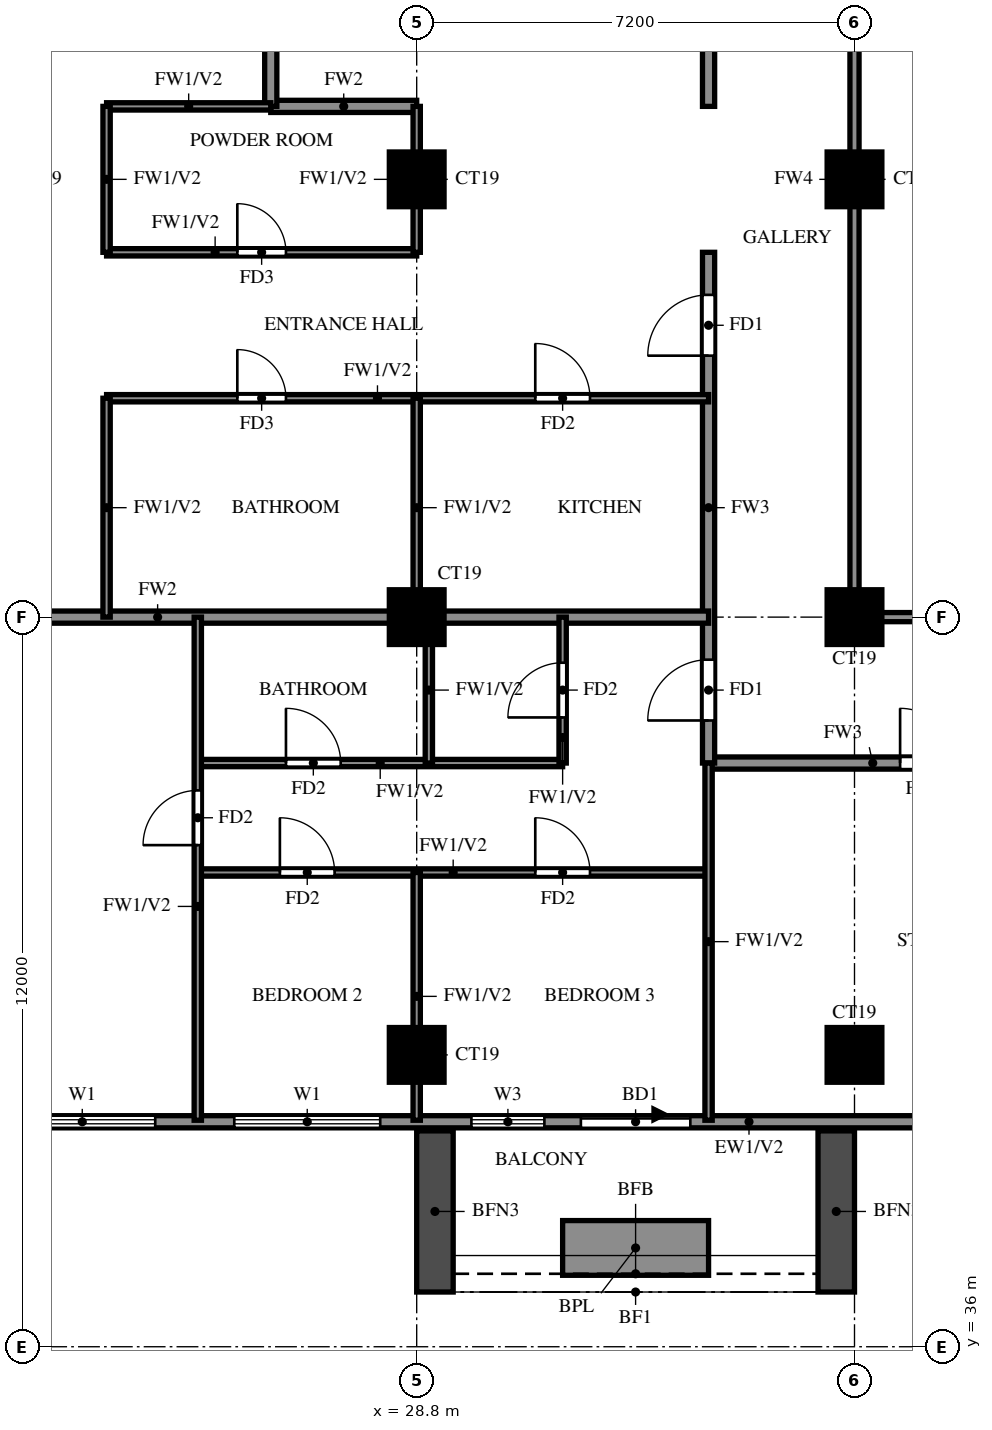
"""IFC4 building model, lengths in metres.
Left out: names, types, materials, properties, quantities, classifications, styles, units other than length and angle.
Written with IfcOpenShell. Run it as: python <this file> out.ifc"""

import sys

from ifc_helpers import new_model, si_unit, direction, frame, frame_2d, origin, origin_2d, place, context, subcontext, project, spatial, rectangle, extrude, source, transform, mapped, element, fill, save


model = new_model("IFC4")
c1 = context("Model", 3, precision=1e-05, world=origin(), true_north=direction((0.0, 1.0)))
c2 = subcontext(c1, "Body", "Model", "MODEL_VIEW")
j1 = project(units=[si_unit("LENGTHUNIT", "METRE"), si_unit("PLANEANGLEUNIT", "RADIAN")], contexts=[c1])
p1 = place(None, origin())
s1 = spatial("IfcSite", under=j1, at=p1, CompositionType="ELEMENT")
p2 = place(p1, origin())
s2 = spatial("IfcBuilding", under=s1, at=p2, CompositionType="ELEMENT")
p3 = place(p2, frame((0.0, 0.0, 178.0)))
s3 = spatial("IfcBuildingStorey", under=s2, at=p3, CompositionType="ELEMENT", Elevation=178.0)
m1 = source(origin(), c2, "Body", "SweptSolid", [
    extrude(rectangle(XDim=0.9, YDim=0.9, at=origin_2d()), origin(), (0.0, 0.0, 1.0), 3.2),
])
for number, where, z_axis, x_axis in (
    (1, (28.8, 40.8, 0.0), (0.0, 0.0, 1.0), (1.0, 0.0, 0.0)),
    (2, (36.0, 40.8, 0.0), (0.0, 0.0, 1.0), (1.0, 0.0, 0.0)),
    (3, (28.8, 48.0, 0.0), (0.0, 0.0, 1.0), (1.0, 0.0, 0.0)),
    (4, (36.0, 48.0, 0.0), (0.0, 0.0, 1.0), (1.0, 0.0, 0.0)),
    (5, (28.8, 55.2, 0.0), (0.0, 0.0, 1.0), (1.0, 0.0, 0.0)),
    (6, (36.0, 55.2, 0.0), (0.0, 0.0, 1.0), (1.0, 0.0, 0.0)),
):
    element("IfcColumn", number, at=place(p3, frame(where, z_axis=z_axis, x_axis=x_axis)), inside=s3, PredefinedType="COLUMN", context=c2, shape_type="MappedRepresentation", body=[
        mapped(m1, transform((0.0, 0.0, 0.0))),
    ])
p4 = place(p3, frame((18.2, 39.7, 0.0), z_axis=(0.0, 0.0, 1.0), x_axis=(1.0, 0.0, 0.0)))
e7 = element("IfcWall", 7, at=p4, inside=s3, PredefinedType="SOLIDWALL", context=c2, shape_type="SweptSolid", body=[
    extrude(rectangle(XDim=23.8, YDim=0.2, at=frame_2d((11.9, 0.0))), origin(), (0.0, 0.0, 1.0), 3.2),
])
p5 = place(p4, frame((13.3, 0.0, 0.0)))
e8 = element("IfcOpeningElement", 8, at=p5, cuts=e7, PredefinedType="OPENING", context=c2, shape_type="SweptSolid", body=[
    extrude(rectangle(XDim=1.8, YDim=2.4, at=frame_2d((0.9, 1.2))), frame((0.0, 0.11, 0.0), z_axis=(0.0, -1.0, 0.0), x_axis=(1.0, 0.0, 0.0)), (0.0, 0.0, 1.0), 0.22),
])
p6 = place(p4, frame((0.9, 0.0, 0.6)))
e9 = element("IfcOpeningElement", 9, at=p6, cuts=e7, PredefinedType="OPENING", context=c2, shape_type="SweptSolid", body=[
    extrude(rectangle(XDim=2.4, YDim=2.4, at=frame_2d((1.2, 1.2))), frame((0.0, 0.11, 0.0), z_axis=(0.0, -1.0, 0.0), x_axis=(1.0, 0.0, 0.0)), (0.0, 0.0, 1.0), 0.22),
])
p7 = place(p4, frame((3.9, 0.0, 0.6)))
e10 = element("IfcOpeningElement", 10, at=p7, cuts=e7, PredefinedType="OPENING", context=c2, shape_type="SweptSolid", body=[
    extrude(rectangle(XDim=2.4, YDim=2.4, at=frame_2d((1.2, 1.2))), frame((0.0, 0.11, 0.0), z_axis=(0.0, -1.0, 0.0), x_axis=(1.0, 0.0, 0.0)), (0.0, 0.0, 1.0), 0.22),
])
p8 = place(p4, frame((7.6, 0.0, 0.6)))
e11 = element("IfcOpeningElement", 11, at=p8, cuts=e7, PredefinedType="OPENING", context=c2, shape_type="SweptSolid", body=[
    extrude(rectangle(XDim=2.4, YDim=2.4, at=frame_2d((1.2, 1.2))), frame((0.0, 0.11, 0.0), z_axis=(0.0, -1.0, 0.0), x_axis=(1.0, 0.0, 0.0)), (0.0, 0.0, 1.0), 0.22),
])
p9 = place(p4, frame((11.5, 0.0, 0.6)))
e12 = element("IfcOpeningElement", 12, at=p9, cuts=e7, PredefinedType="OPENING", context=c2, shape_type="SweptSolid", body=[
    extrude(rectangle(XDim=1.2, YDim=2.4, at=frame_2d((0.6, 1.2))), frame((0.0, 0.11, 0.0), z_axis=(0.0, -1.0, 0.0), x_axis=(1.0, 0.0, 0.0)), (0.0, 0.0, 1.0), 0.22),
])
for number, where, z_axis, x_axis in (
    (13, (29.1, 39.55, 0.0), (0.0, 0.0, 1.0), (0.0, -1.0, 0.0)),
    (14, (35.7, 39.55, 0.0), (0.0, 0.0, 1.0), (0.0, -1.0, 0.0)),
):
    element("IfcWall", number, at=place(p3, frame(where, z_axis=z_axis, x_axis=x_axis)), inside=s3, PredefinedType="SOLIDWALL", context=c2, shape_type="SweptSolid", body=[
        extrude(rectangle(XDim=2.65, YDim=0.6, at=frame_2d((1.325, 0.0))), origin(), (0.0, 0.0, 1.0), 2.85),
    ])
p10 = place(p3, frame((31.2, 37.625, 0.0), z_axis=(0.0, 0.0, 1.0), x_axis=(1.0, 0.0, 0.0)))
e15 = element("IfcWall", 15, at=p10, inside=s3, PredefinedType="SOLIDWALL", context=c2, shape_type="SweptSolid", body=[
    extrude(rectangle(XDim=2.4, YDim=0.9, at=frame_2d((1.2, 0.0))), origin(), (0.0, 0.0, 1.0), 0.9),
])
p11 = place(p3, frame((33.6, 45.6, 0.0), z_axis=(0.0, 0.0, 1.0), x_axis=(1.0, 0.0, 0.0)))
e16 = element("IfcWall", 16, at=p11, inside=s3, PredefinedType="SOLIDWALL", context=c2, shape_type="SweptSolid", body=[
    extrude(rectangle(XDim=7.2, YDim=0.2, at=frame_2d((3.6, 0.0))), origin(), (0.0, 0.0, 1.0), 3.2),
])
p12 = place(p11, frame((3.15, 0.0, 0.0)))
e17 = element("IfcOpeningElement", 17, at=p12, cuts=e16, PredefinedType="OPENING", context=c2, shape_type="SweptSolid", body=[
    extrude(rectangle(XDim=0.9, YDim=2.1, at=frame_2d((0.45, 1.05))), frame((0.0, 0.11, 0.0), z_axis=(0.0, -1.0, 0.0), x_axis=(1.0, 0.0, 0.0)), (0.0, 0.0, 1.0), 0.22),
])
p13 = place(p3, frame((33.6, 45.6, 0.0), z_axis=(0.0, 0.0, 1.0), x_axis=(0.0, 1.0, 0.0)))
e18 = element("IfcWall", 18, at=p13, inside=s3, PredefinedType="SOLIDWALL", context=c2, shape_type="SweptSolid", body=[
    extrude(rectangle(XDim=8.4, YDim=0.2, at=frame_2d((4.2, 0.0))), origin(), (0.0, 0.0, 1.0), 3.2),
])
p14 = place(p13, frame((0.7, 0.0, 0.0)))
e19 = element("IfcOpeningElement", 19, at=p14, cuts=e18, PredefinedType="OPENING", context=c2, shape_type="SweptSolid", body=[
    extrude(rectangle(XDim=1.0, YDim=2.1, at=frame_2d((0.5, 1.05))), frame((0.0, 0.11, 0.0), z_axis=(0.0, -1.0, 0.0), x_axis=(1.0, 0.0, 0.0)), (0.0, 0.0, 1.0), 0.22),
])
p15 = place(p13, frame((6.7, 0.0, 0.0)))
e20 = element("IfcOpeningElement", 20, at=p15, cuts=e18, PredefinedType="OPENING", context=c2, shape_type="SweptSolid", body=[
    extrude(rectangle(XDim=1.0, YDim=2.1, at=frame_2d((0.5, 1.05))), frame((0.0, 0.11, 0.0), z_axis=(0.0, -1.0, 0.0), x_axis=(1.0, 0.0, 0.0)), (0.0, 0.0, 1.0), 0.22),
])
p16 = place(p3, frame((33.6, 56.4, 0.0), z_axis=(0.0, 0.0, 1.0), x_axis=(0.0, 1.0, 0.0)))
e21 = element("IfcWall", 21, at=p16, inside=s3, PredefinedType="SOLIDWALL", context=c2, shape_type="SweptSolid", body=[
    extrude(rectangle(XDim=6.0, YDim=0.2, at=frame_2d((3.0, 0.0))), origin(), (0.0, 0.0, 1.0), 3.2),
])
p17 = place(p16, frame((3.7, 0.0, 0.0)))
e22 = element("IfcOpeningElement", 22, at=p17, cuts=e21, PredefinedType="OPENING", context=c2, shape_type="SweptSolid", body=[
    extrude(rectangle(XDim=1.0, YDim=2.1, at=frame_2d((0.5, 1.05))), frame((0.0, 0.11, 0.0), z_axis=(0.0, -1.0, 0.0), x_axis=(1.0, 0.0, 0.0)), (0.0, 0.0, 1.0), 0.22),
])
p18 = place(p3, frame((14.525, 48.0, 0.0), z_axis=(0.0, 0.0, 1.0), x_axis=(1.0, 0.0, 0.0)))
e23 = element("IfcWall", 23, at=p18, inside=s3, PredefinedType="SOLIDWALL", context=c2, shape_type="SweptSolid", body=[
    extrude(rectangle(XDim=19.075, YDim=0.2, at=frame_2d((9.538, 0.0))), origin(), (0.0, 0.0, 1.0), 3.2),
])
for number, where, z_axis, x_axis in (
    (24, (26.4, 56.4, 0.0), (0.0, 0.0, 1.0), (1.0, 0.0, 0.0)),
    (25, (26.4, 56.4, 0.0), (0.0, 0.0, 1.0), (0.0, 1.0, 0.0)),
):
    element("IfcWall", number, at=place(p3, frame(where, z_axis=z_axis, x_axis=x_axis)), inside=s3, PredefinedType="SOLIDWALL", context=c2, shape_type="SweptSolid", body=[
        extrude(rectangle(XDim=2.4, YDim=0.2, at=frame_2d((1.2, 0.0))), origin(), (0.0, 0.0, 1.0), 3.2),
    ])
p19 = place(p3, frame((25.2, 43.8, 0.0), z_axis=(0.0, 0.0, 1.0), x_axis=(1.0, 0.0, 0.0)))
e26 = element("IfcWall", 26, at=p19, inside=s3, PredefinedType="PARTITIONING", context=c2, shape_type="SweptSolid", body=[
    extrude(rectangle(XDim=8.4, YDim=0.12, at=frame_2d((4.2, 0.0))), origin(), (0.0, 0.0, 1.0), 3.2),
])
p20 = place(p19, frame((1.35, 0.0, 0.0)))
e27 = element("IfcOpeningElement", 27, at=p20, cuts=e26, PredefinedType="OPENING", context=c2, shape_type="SweptSolid", body=[
    extrude(rectangle(XDim=0.9, YDim=2.1, at=frame_2d((0.45, 1.05))), frame((0.0, 0.07, 0.0), z_axis=(0.0, -1.0, 0.0), x_axis=(1.0, 0.0, 0.0)), (0.0, 0.0, 1.0), 0.14),
])
p21 = place(p19, frame((5.55, 0.0, 0.0)))
e28 = element("IfcOpeningElement", 28, at=p21, cuts=e26, PredefinedType="OPENING", context=c2, shape_type="SweptSolid", body=[
    extrude(rectangle(XDim=0.9, YDim=2.1, at=frame_2d((0.45, 1.05))), frame((0.0, 0.07, 0.0), z_axis=(0.0, -1.0, 0.0), x_axis=(1.0, 0.0, 0.0)), (0.0, 0.0, 1.0), 0.14),
])
p22 = place(p3, frame((25.2, 45.6, 0.0), z_axis=(0.0, 0.0, 1.0), x_axis=(1.0, 0.0, 0.0)))
e29 = element("IfcWall", 29, at=p22, inside=s3, PredefinedType="PARTITIONING", context=c2, shape_type="SweptSolid", body=[
    extrude(rectangle(XDim=6.0, YDim=0.12, at=frame_2d((3.0, 0.0))), origin(), (0.0, 0.0, 1.0), 3.2),
])
p23 = place(p22, frame((1.45, 0.0, 0.0)))
e30 = element("IfcOpeningElement", 30, at=p23, cuts=e29, PredefinedType="OPENING", context=c2, shape_type="SweptSolid", body=[
    extrude(rectangle(XDim=0.9, YDim=2.1, at=frame_2d((0.45, 1.05))), frame((0.0, 0.07, 0.0), z_axis=(0.0, -1.0, 0.0), x_axis=(1.0, 0.0, 0.0)), (0.0, 0.0, 1.0), 0.14),
])
p24 = place(p3, frame((23.7, 51.6, 0.0), z_axis=(0.0, 0.0, 1.0), x_axis=(1.0, 0.0, 0.0)))
e31 = element("IfcWall", 31, at=p24, inside=s3, PredefinedType="PARTITIONING", context=c2, shape_type="SweptSolid", body=[
    extrude(rectangle(XDim=9.9, YDim=0.12, at=frame_2d((4.95, 0.0))), origin(), (0.0, 0.0, 1.0), 3.2),
])
p25 = place(p24, frame((2.15, 0.0, 0.0)))
e32 = element("IfcOpeningElement", 32, at=p25, cuts=e31, PredefinedType="OPENING", context=c2, shape_type="SweptSolid", body=[
    extrude(rectangle(XDim=0.8, YDim=2.1, at=frame_2d((0.4, 1.05))), frame((0.0, 0.07, 0.0), z_axis=(0.0, -1.0, 0.0), x_axis=(1.0, 0.0, 0.0)), (0.0, 0.0, 1.0), 0.14),
])
p26 = place(p24, frame((7.05, 0.0, 0.0)))
e33 = element("IfcOpeningElement", 33, at=p26, cuts=e31, PredefinedType="OPENING", context=c2, shape_type="SweptSolid", body=[
    extrude(rectangle(XDim=0.9, YDim=2.1, at=frame_2d((0.45, 1.05))), frame((0.0, 0.07, 0.0), z_axis=(0.0, -1.0, 0.0), x_axis=(1.0, 0.0, 0.0)), (0.0, 0.0, 1.0), 0.14),
])
p27 = place(p3, frame((23.7, 54.0, 0.0), z_axis=(0.0, 0.0, 1.0), x_axis=(1.0, 0.0, 0.0)))
e34 = element("IfcWall", 34, at=p27, inside=s3, PredefinedType="PARTITIONING", context=c2, shape_type="SweptSolid", body=[
    extrude(rectangle(XDim=5.1, YDim=0.12, at=frame_2d((2.55, 0.0))), origin(), (0.0, 0.0, 1.0), 3.2),
])
p28 = place(p27, frame((2.15, 0.0, 0.0)))
e35 = element("IfcOpeningElement", 35, at=p28, cuts=e34, PredefinedType="OPENING", context=c2, shape_type="SweptSolid", body=[
    extrude(rectangle(XDim=0.8, YDim=2.1, at=frame_2d((0.4, 1.05))), frame((0.0, 0.07, 0.0), z_axis=(0.0, -1.0, 0.0), x_axis=(1.0, 0.0, 0.0)), (0.0, 0.0, 1.0), 0.14),
])
p29 = place(p3, frame((23.7, 56.4, 0.0), z_axis=(0.0, 0.0, 1.0), x_axis=(1.0, 0.0, 0.0)))
e36 = element("IfcWall", 36, at=p29, inside=s3, PredefinedType="PARTITIONING", context=c2, shape_type="SweptSolid", body=[
    extrude(rectangle(XDim=2.7, YDim=0.12, at=frame_2d((1.35, 0.0))), origin(), (0.0, 0.0, 1.0), 3.2),
])
p30 = place(p3, frame((23.7, 48.0, 0.0), z_axis=(0.0, 0.0, 1.0), x_axis=(0.0, 1.0, 0.0)))
e37 = element("IfcWall", 37, at=p30, inside=s3, PredefinedType="PARTITIONING", context=c2, shape_type="SweptSolid", body=[
    extrude(rectangle(XDim=3.6, YDim=0.12, at=frame_2d((1.8, 0.0))), origin(), (0.0, 0.0, 1.0), 3.2),
])
p31 = place(p3, frame((23.7, 54.0, 0.0), z_axis=(0.0, 0.0, 1.0), x_axis=(0.0, 1.0, 0.0)))
e38 = element("IfcWall", 38, at=p31, inside=s3, PredefinedType="PARTITIONING", context=c2, shape_type="SweptSolid", body=[
    extrude(rectangle(XDim=2.4, YDim=0.12, at=frame_2d((1.2, 0.0))), origin(), (0.0, 0.0, 1.0), 3.2),
])
p32 = place(p3, frame((25.2, 39.725, 0.0), z_axis=(0.0, 0.0, 1.0), x_axis=(0.0, 1.0, 0.0)))
e39 = element("IfcWall", 39, at=p32, inside=s3, PredefinedType="PARTITIONING", context=c2, shape_type="SweptSolid", body=[
    extrude(rectangle(XDim=8.275, YDim=0.12, at=frame_2d((4.137, 0.0))), origin(), (0.0, 0.0, 1.0), 3.2),
])
p33 = place(p32, frame((4.525, 0.0, 0.0)))
e40 = element("IfcOpeningElement", 40, at=p33, cuts=e39, PredefinedType="OPENING", context=c2, shape_type="SweptSolid", body=[
    extrude(rectangle(XDim=0.9, YDim=2.1, at=frame_2d((0.45, 1.05))), frame((0.0, 0.07, 0.0), z_axis=(0.0, -1.0, 0.0), x_axis=(1.0, 0.0, 0.0)), (0.0, 0.0, 1.0), 0.14),
])
p34 = place(p3, frame((28.8, 39.725, 0.0), z_axis=(0.0, 0.0, 1.0), x_axis=(0.0, 1.0, 0.0)))
e41 = element("IfcWall", 41, at=p34, inside=s3, PredefinedType="PARTITIONING", context=c2, shape_type="SweptSolid", body=[
    extrude(rectangle(XDim=4.075, YDim=0.12, at=frame_2d((2.038, 0.0))), origin(), (0.0, 0.0, 1.0), 3.2),
])
p35 = place(p3, frame((28.8, 48.0, 0.0), z_axis=(0.0, 0.0, 1.0), x_axis=(0.0, 1.0, 0.0)))
e42 = element("IfcWall", 42, at=p35, inside=s3, PredefinedType="PARTITIONING", context=c2, shape_type="SweptSolid", body=[
    extrude(rectangle(XDim=3.6, YDim=0.12, at=frame_2d((1.8, 0.0))), origin(), (0.0, 0.0, 1.0), 3.2),
])
for number, where, z_axis, x_axis in (
    (43, (28.8, 54.0, 0.0), (0.0, 0.0, 1.0), (0.0, 1.0, 0.0)),
    (44, (29.0, 45.6, 0.0), (0.0, 0.0, 1.0), (0.0, 1.0, 0.0)),
):
    element("IfcWall", number, at=place(p3, frame(where, z_axis=z_axis, x_axis=x_axis)), inside=s3, PredefinedType="PARTITIONING", context=c2, shape_type="SweptSolid", body=[
        extrude(rectangle(XDim=2.4, YDim=0.12, at=frame_2d((1.2, 0.0))), origin(), (0.0, 0.0, 1.0), 3.2),
    ])
p36 = place(p3, frame((31.2, 45.6, 0.0), z_axis=(0.0, 0.0, 1.0), x_axis=(0.0, 1.0, 0.0)))
e45 = element("IfcWall", 45, at=p36, inside=s3, PredefinedType="PARTITIONING", context=c2, shape_type="SweptSolid", body=[
    extrude(rectangle(XDim=2.4, YDim=0.12, at=frame_2d((1.2, 0.0))), origin(), (0.0, 0.0, 1.0), 3.2),
])
p37 = place(p36, frame((0.75, 0.0, 0.0)))
e46 = element("IfcOpeningElement", 46, at=p37, cuts=e45, PredefinedType="OPENING", context=c2, shape_type="SweptSolid", body=[
    extrude(rectangle(XDim=0.9, YDim=2.1, at=frame_2d((0.45, 1.05))), frame((0.0, 0.07, 0.0), z_axis=(0.0, -1.0, 0.0), x_axis=(1.0, 0.0, 0.0)), (0.0, 0.0, 1.0), 0.14),
])
p38 = place(p3, frame((33.6, 39.725, 0.0), z_axis=(0.0, 0.0, 1.0), x_axis=(0.0, 1.0, 0.0)))
e47 = element("IfcWall", 47, at=p38, inside=s3, PredefinedType="PARTITIONING", context=c2, shape_type="SweptSolid", body=[
    extrude(rectangle(XDim=5.875, YDim=0.12, at=frame_2d((2.938, 0.0))), origin(), (0.0, 0.0, 1.0), 3.2),
])
p39 = place(p3, frame((36.0, 48.0, 0.0), z_axis=(0.0, 0.0, 1.0), x_axis=(1.0, 0.0, 0.0)))
e48 = element("IfcWall", 48, at=p39, inside=s3, PredefinedType="SOLIDWALL", context=c2, shape_type="SweptSolid", body=[
    extrude(rectangle(XDim=7.2, YDim=0.15, at=frame_2d((3.6, 0.0))), origin(), (0.0, 0.0, 1.0), 2.3),
])
p40 = place(p3, frame((36.0, 48.0, 0.0), z_axis=(0.0, 0.0, 1.0), x_axis=(0.0, 1.0, 0.0)))
e49 = element("IfcWall", 49, at=p40, inside=s3, PredefinedType="SOLIDWALL", context=c2, shape_type="SweptSolid", body=[
    extrude(rectangle(XDim=14.4, YDim=0.15, at=frame_2d((7.2, 0.0))), origin(), (0.0, 0.0, 1.0), 2.3),
])
p41 = place(p5, origin())
e50 = element("IfcDoor", 50, at=p41, inside=s3, OperationType="DOUBLE_DOOR_SLIDING", PredefinedType="DOOR", context=c2, shape_type="SweptSolid", body=[
    extrude(rectangle(XDim=1.8, YDim=2.4, at=frame_2d((0.9, 1.2))), frame((0.0, 0.025, 0.0), z_axis=(0.0, -1.0, 0.0), x_axis=(1.0, 0.0, 0.0)), (0.0, 0.0, 1.0), 0.05),
])
fill(e8, e50)
p42 = place(p7, origin())
e51 = element("IfcWindow", 51, at=p42, inside=s3, PartitioningType="DOUBLE_PANEL_VERTICAL", PredefinedType="WINDOW", context=c2, shape_type="SweptSolid", body=[
    extrude(rectangle(XDim=2.4, YDim=2.4, at=frame_2d((1.2, 1.2))), frame((0.0, 0.03, 0.0), z_axis=(0.0, -1.0, 0.0), x_axis=(1.0, 0.0, 0.0)), (0.0, 0.0, 1.0), 0.06),
])
fill(e10, e51)
p43 = place(p8, origin())
e52 = element("IfcWindow", 52, at=p43, inside=s3, PartitioningType="DOUBLE_PANEL_VERTICAL", PredefinedType="WINDOW", context=c2, shape_type="SweptSolid", body=[
    extrude(rectangle(XDim=2.4, YDim=2.4, at=frame_2d((1.2, 1.2))), frame((0.0, 0.03, 0.0), z_axis=(0.0, -1.0, 0.0), x_axis=(1.0, 0.0, 0.0)), (0.0, 0.0, 1.0), 0.06),
])
fill(e11, e52)
p44 = place(p9, origin())
e53 = element("IfcWindow", 53, at=p44, inside=s3, PartitioningType="SINGLE_PANEL", PredefinedType="WINDOW", context=c2, shape_type="SweptSolid", body=[
    extrude(rectangle(XDim=1.2, YDim=2.4, at=frame_2d((0.6, 1.2))), frame((0.0, 0.03, 0.0), z_axis=(0.0, -1.0, 0.0), x_axis=(1.0, 0.0, 0.0)), (0.0, 0.0, 1.0), 0.06),
])
fill(e12, e53)
p45 = place(p14, origin())
e54 = element("IfcDoor", 54, at=p45, inside=s3, OperationType="SINGLE_SWING_LEFT", PredefinedType="DOOR", context=c2, shape_type="SweptSolid", body=[
    extrude(rectangle(XDim=1.0, YDim=2.1, at=frame_2d((0.5, 1.05))), frame((0.0, 0.025, 0.0), z_axis=(0.0, -1.0, 0.0), x_axis=(1.0, 0.0, 0.0)), (0.0, 0.0, 1.0), 0.05),
])
fill(e19, e54)
p46 = place(p33, origin())
e55 = element("IfcDoor", 55, at=p46, inside=s3, OperationType="SINGLE_SWING_RIGHT", PredefinedType="DOOR", context=c2, shape_type="SweptSolid", body=[
    extrude(rectangle(XDim=0.9, YDim=2.1, at=frame_2d((0.45, 1.05))), frame((0.0, 0.025, 0.0), z_axis=(0.0, -1.0, 0.0), x_axis=(1.0, 0.0, 0.0)), (0.0, 0.0, 1.0), 0.05),
])
fill(e40, e55)
p47 = place(p20, origin())
e56 = element("IfcDoor", 56, at=p47, inside=s3, OperationType="SINGLE_SWING_LEFT", PredefinedType="DOOR", context=c2, shape_type="SweptSolid", body=[
    extrude(rectangle(XDim=0.9, YDim=2.1, at=frame_2d((0.45, 1.05))), frame((0.0, 0.025, 0.0), z_axis=(0.0, -1.0, 0.0), x_axis=(1.0, 0.0, 0.0)), (0.0, 0.0, 1.0), 0.05),
])
fill(e27, e56)
p48 = place(p21, origin())
e57 = element("IfcDoor", 57, at=p48, inside=s3, OperationType="SINGLE_SWING_LEFT", PredefinedType="DOOR", context=c2, shape_type="SweptSolid", body=[
    extrude(rectangle(XDim=0.9, YDim=2.1, at=frame_2d((0.45, 1.05))), frame((0.0, 0.025, 0.0), z_axis=(0.0, -1.0, 0.0), x_axis=(1.0, 0.0, 0.0)), (0.0, 0.0, 1.0), 0.05),
])
fill(e28, e57)
p49 = place(p23, origin())
e58 = element("IfcDoor", 58, at=p49, inside=s3, OperationType="SINGLE_SWING_RIGHT", PredefinedType="DOOR", context=c2, shape_type="SweptSolid", body=[
    extrude(rectangle(XDim=0.9, YDim=2.1, at=frame_2d((0.45, 1.05))), frame((0.0, 0.025, 0.0), z_axis=(0.0, -1.0, 0.0), x_axis=(1.0, 0.0, 0.0)), (0.0, 0.0, 1.0), 0.05),
])
fill(e30, e58)
p50 = place(p37, origin())
e59 = element("IfcDoor", 59, at=p50, inside=s3, OperationType="SINGLE_SWING_LEFT", PredefinedType="DOOR", context=c2, shape_type="SweptSolid", body=[
    extrude(rectangle(XDim=0.9, YDim=2.1, at=frame_2d((0.45, 1.05))), frame((0.0, 0.025, 0.0), z_axis=(0.0, -1.0, 0.0), x_axis=(1.0, 0.0, 0.0)), (0.0, 0.0, 1.0), 0.05),
])
fill(e46, e59)
p51 = place(p12, origin())
e60 = element("IfcDoor", 60, at=p51, inside=s3, OperationType="SINGLE_SWING_LEFT", PredefinedType="DOOR", context=c2, shape_type="SweptSolid", body=[
    extrude(rectangle(XDim=0.9, YDim=2.1, at=frame_2d((0.45, 1.05))), frame((0.0, 0.025, 0.0), z_axis=(0.0, -1.0, 0.0), x_axis=(1.0, 0.0, 0.0)), (0.0, 0.0, 1.0), 0.05),
])
fill(e17, e60)
p52 = place(p15, origin())
e61 = element("IfcDoor", 61, at=p52, inside=s3, OperationType="SINGLE_SWING_RIGHT", PredefinedType="DOOR", context=c2, shape_type="SweptSolid", body=[
    extrude(rectangle(XDim=1.0, YDim=2.1, at=frame_2d((0.5, 1.05))), frame((0.0, 0.025, 0.0), z_axis=(0.0, -1.0, 0.0), x_axis=(1.0, 0.0, 0.0)), (0.0, 0.0, 1.0), 0.05),
])
fill(e20, e61)
p53 = place(p25, origin())
e62 = element("IfcDoor", 62, at=p53, inside=s3, OperationType="SINGLE_SWING_RIGHT", PredefinedType="DOOR", context=c2, shape_type="SweptSolid", body=[
    extrude(rectangle(XDim=0.8, YDim=2.1, at=frame_2d((0.4, 1.05))), frame((0.0, 0.025, 0.0), z_axis=(0.0, -1.0, 0.0), x_axis=(1.0, 0.0, 0.0)), (0.0, 0.0, 1.0), 0.05),
])
fill(e32, e62)
p54 = place(p28, origin())
e63 = element("IfcDoor", 63, at=p54, inside=s3, OperationType="SINGLE_SWING_LEFT", PredefinedType="DOOR", context=c2, shape_type="SweptSolid", body=[
    extrude(rectangle(XDim=0.8, YDim=2.1, at=frame_2d((0.4, 1.05))), frame((0.0, 0.025, 0.0), z_axis=(0.0, -1.0, 0.0), x_axis=(1.0, 0.0, 0.0)), (0.0, 0.0, 1.0), 0.05),
])
fill(e35, e63)
p55 = place(p26, origin())
e64 = element("IfcDoor", 64, at=p55, inside=s3, OperationType="SINGLE_SWING_LEFT", PredefinedType="DOOR", context=c2, shape_type="SweptSolid", body=[
    extrude(rectangle(XDim=0.9, YDim=2.1, at=frame_2d((0.45, 1.05))), frame((0.0, 0.025, 0.0), z_axis=(0.0, -1.0, 0.0), x_axis=(1.0, 0.0, 0.0)), (0.0, 0.0, 1.0), 0.05),
])
fill(e33, e64)
save(model, sys.argv[1])
